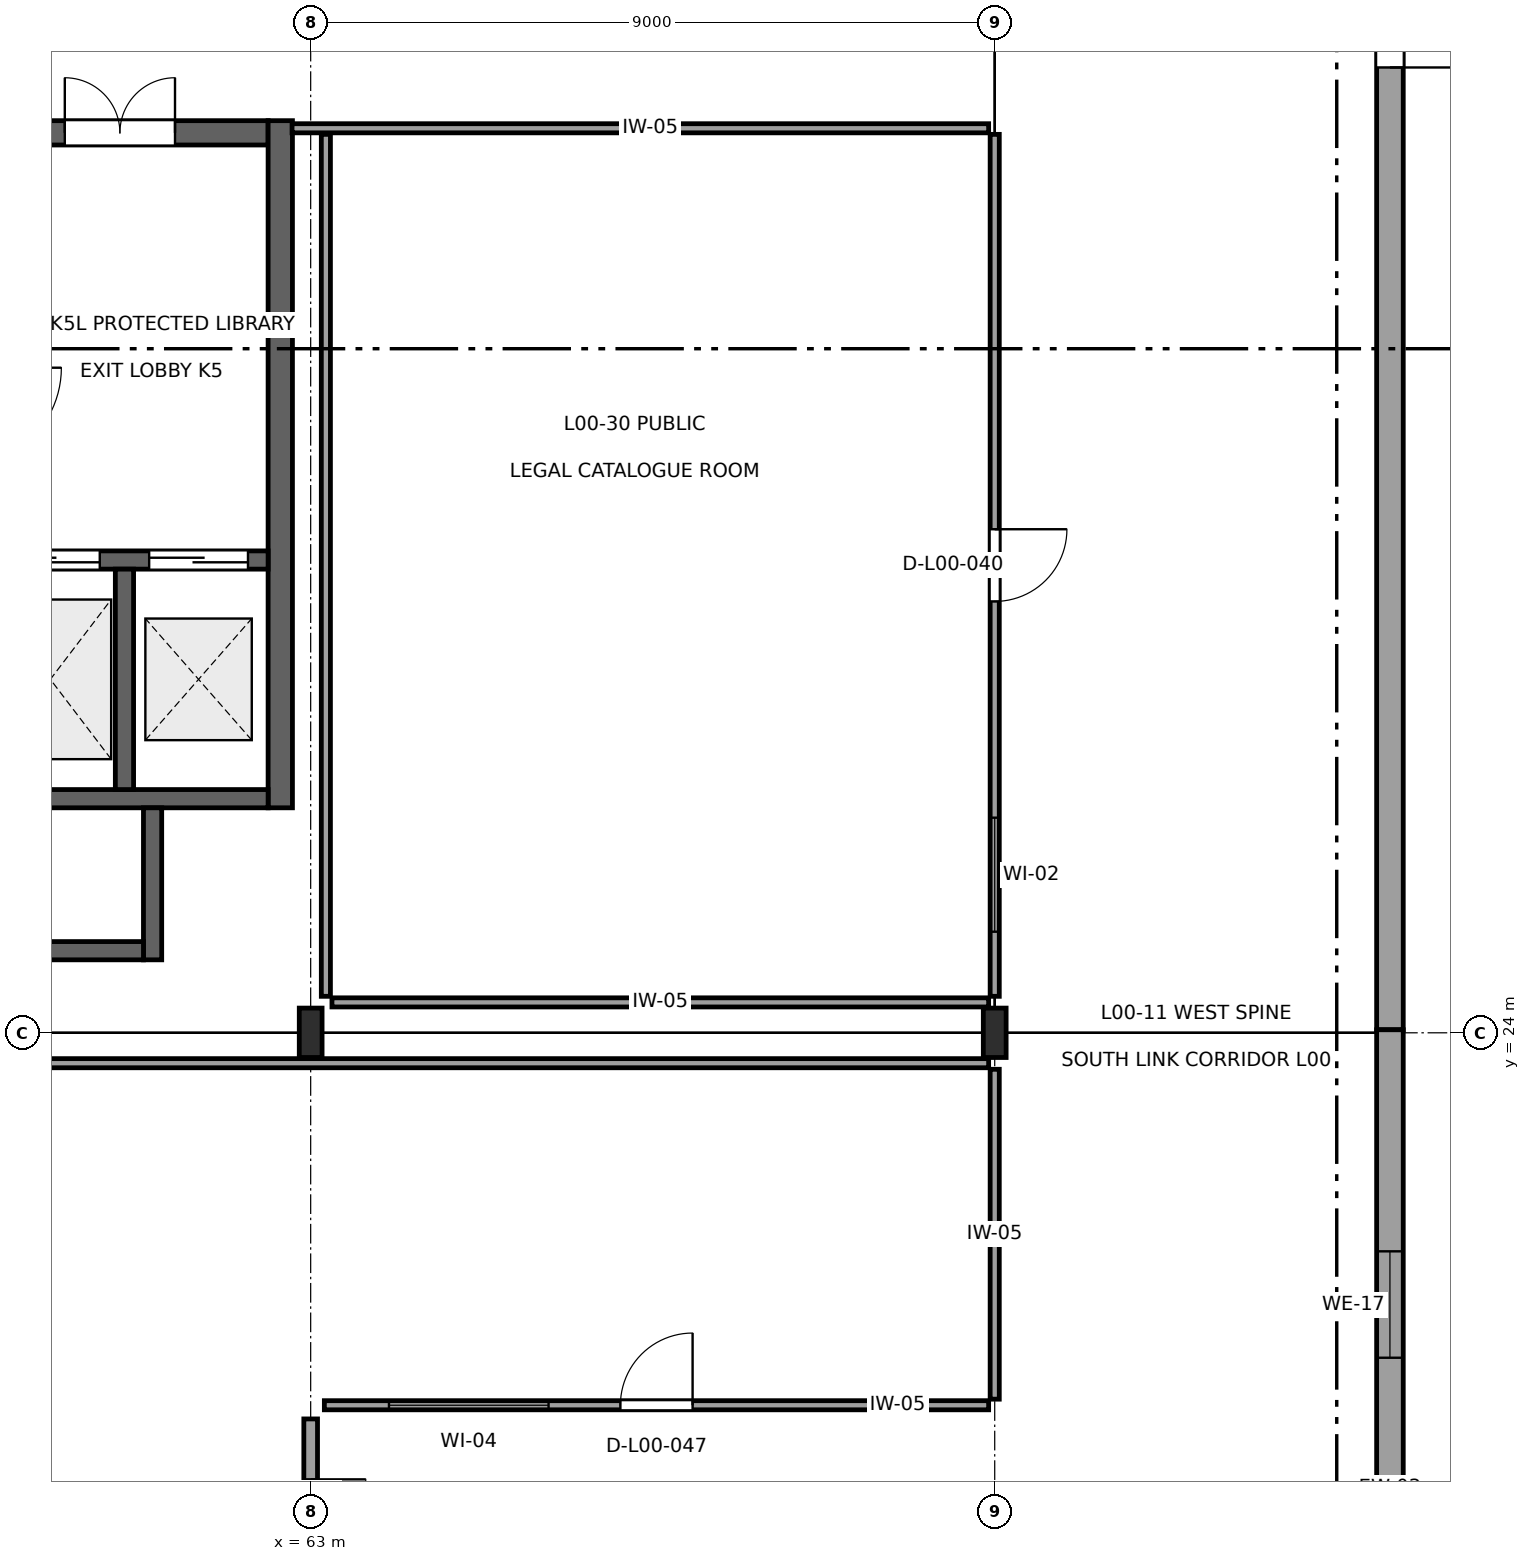
"""IFC4 building model, lengths in metres.
Left out: names, types, materials, properties, quantities, classifications, styles, units other than length and angle.
Written with IfcOpenShell. Run it as: python <this file> out.ifc"""

import sys

from ifc_helpers import new_model, si_unit, direction, frame, frame_2d, origin, origin_2d, place, context, subcontext, project, spatial, rectangle, i_section, extrude, element, fill, save


model = new_model("IFC4")
c1 = context("Model", 3, precision=1e-05, world=origin(), true_north=direction((0.0, 1.0)))
c2 = subcontext(c1, "Body", "Model", "MODEL_VIEW")
j1 = project(units=[si_unit("LENGTHUNIT", "METRE"), si_unit("PLANEANGLEUNIT", "RADIAN")], contexts=[c1])
p1 = place(None, origin())
s1 = spatial("IfcSite", under=j1, at=p1, CompositionType="ELEMENT")
p2 = place(p1, origin())
s2 = spatial("IfcBuilding", under=s1, at=p2, CompositionType="ELEMENT")
p3 = place(p2, origin())
s3 = spatial("IfcBuildingStorey", under=s2, at=p3, CompositionType="ELEMENT", Elevation=0.0)
for number, where, z_axis, x_axis in (
    (1, (63.0, 24.0, 0.0), (0.0, 0.0, 1.0), (1.0, 0.0, 0.0)),
    (2, (72.0, 24.0, 0.0), (0.0, 0.0, 1.0), (1.0, 0.0, 0.0)),
):
    element("IfcColumn", number, at=place(p3, frame(where, z_axis=z_axis, x_axis=x_axis)), inside=s3, PredefinedType="COLUMN", context=c2, shape_type="SweptSolid", body=[
        extrude(i_section(OverallWidth=0.3, OverallDepth=0.65, WebThickness=0.016, FlangeThickness=0.031, at=origin_2d()), origin(), (0.0, 0.0, 1.0), 5.4),
    ])
p4 = place(p3, frame((77.2, 24.04, 0.0), z_axis=(0.0, 0.0, 1.0), x_axis=(0.0, 1.0, 0.0)))
e3 = element("IfcWall", 3, at=p4, inside=s3, PredefinedType="SOLIDWALL", context=c2, shape_type="SweptSolid", body=[
    extrude(rectangle(XDim=17.97, YDim=0.35, at=frame_2d((8.985, 0.0))), origin(), (0.0, 0.0, 1.0), 5.08),
])
p5 = place(p4, frame((12.66, 0.0, 0.0)))
e4 = element("IfcOpeningElement", 4, at=p5, cuts=e3, PredefinedType="OPENING", context=c2, shape_type="SweptSolid", body=[
    extrude(rectangle(XDim=1.8, YDim=2.4, at=frame_2d((0.9, 1.2))), frame((0.0, 0.19, 0.0), z_axis=(0.0, -1.0, 0.0), x_axis=(1.0, 0.0, 0.0)), (0.0, 0.0, 1.0), 0.38),
])
p6 = place(p3, frame((77.2, 11.99, 0.0), z_axis=(0.0, 0.0, 1.0), x_axis=(0.0, 1.0, 0.0)))
e5 = element("IfcWall", 5, at=p6, inside=s3, PredefinedType="SOLIDWALL", context=c2, shape_type="SweptSolid", body=[
    extrude(rectangle(XDim=12.05, YDim=0.35, at=frame_2d((6.025, 0.0))), origin(), (0.0, 0.0, 1.0), 5.08),
])
p7 = place(p6, frame((2.07, 0.0, 0.85)))
e6 = element("IfcOpeningElement", 6, at=p7, cuts=e5, PredefinedType="OPENING", context=c2, shape_type="SweptSolid", body=[
    extrude(rectangle(XDim=1.4, YDim=1.4, at=frame_2d((0.7, 0.7))), frame((0.0, 0.19, 0.0), z_axis=(0.0, -1.0, 0.0), x_axis=(1.0, 0.0, 0.0)), (0.0, 0.0, 1.0), 0.38),
])
p8 = place(p6, frame((7.735, 0.0, 0.85)))
e7 = element("IfcOpeningElement", 7, at=p8, cuts=e5, PredefinedType="OPENING", context=c2, shape_type="SweptSolid", body=[
    extrude(rectangle(XDim=1.4, YDim=1.4, at=frame_2d((0.7, 0.7))), frame((0.0, 0.19, 0.0), z_axis=(0.0, -1.0, 0.0), x_axis=(1.0, 0.0, 0.0)), (0.0, 0.0, 1.0), 0.38),
])
p9 = place(p3, frame((58.54, 35.84, 0.0), z_axis=(0.0, 0.0, 1.0), x_axis=(1.0, 0.0, 0.0)))
e8 = element("IfcWall", 8, at=p9, inside=s3, PredefinedType="SHEAR", context=c2, shape_type="SweptSolid", body=[
    extrude(rectangle(XDim=3.9, YDim=0.32, at=frame_2d((1.95, 0.0))), origin(), (0.0, 0.0, 1.0), 5.06),
])
p10 = place(p9, frame((1.225, 0.0, 0.0)))
e9 = element("IfcOpeningElement", 9, at=p10, cuts=e8, PredefinedType="OPENING", context=c2, shape_type="SweptSolid", body=[
    extrude(rectangle(XDim=1.45, YDim=2.2, at=frame_2d((0.725, 1.1))), frame((0.0, 0.175, 0.0), z_axis=(0.0, -1.0, 0.0), x_axis=(1.0, 0.0, 0.0)), (0.0, 0.0, 1.0), 0.35),
])
p11 = place(p3, frame((62.6, 26.96, 0.0), z_axis=(0.0, 0.0, 1.0), x_axis=(0.0, 1.0, 0.0)))
e10 = element("IfcWall", 10, at=p11, inside=s3, PredefinedType="SHEAR", context=c2, shape_type="SweptSolid", body=[
    extrude(rectangle(XDim=9.04, YDim=0.32, at=frame_2d((4.52, 0.0))), origin(), (0.0, 0.0, 1.0), 5.06),
])
p12 = place(p3, frame((58.54, 30.22, 0.0), z_axis=(0.0, 0.0, 1.0), x_axis=(1.0, 0.0, 0.0)))
e11 = element("IfcWall", 11, at=p12, inside=s3, PredefinedType="SHEAR", context=c2, shape_type="SweptSolid", body=[
    extrude(rectangle(XDim=3.9, YDim=0.24, at=frame_2d((1.95, 0.0))), origin(), (0.0, 0.0, 1.0), 5.21),
])
p13 = place(p12, frame((0.385, 0.0, 0.0)))
e12 = element("IfcOpeningElement", 12, at=p13, cuts=e11, PredefinedType="OPENING", context=c2, shape_type="SweptSolid", body=[
    extrude(rectangle(XDim=1.3, YDim=2.2, at=frame_2d((0.65, 1.1))), frame((0.0, 0.135, 0.0), z_axis=(0.0, -1.0, 0.0), x_axis=(1.0, 0.0, 0.0)), (0.0, 0.0, 1.0), 0.27),
])
p14 = place(p12, frame((2.335, 0.0, 0.0)))
e13 = element("IfcOpeningElement", 13, at=p14, cuts=e11, PredefinedType="OPENING", context=c2, shape_type="SweptSolid", body=[
    extrude(rectangle(XDim=1.3, YDim=2.2, at=frame_2d((0.65, 1.1))), frame((0.0, 0.135, 0.0), z_axis=(0.0, -1.0, 0.0), x_axis=(1.0, 0.0, 0.0)), (0.0, 0.0, 1.0), 0.27),
])
p15 = place(p3, frame((58.54, 27.08, 0.0), z_axis=(0.0, 0.0, 1.0), x_axis=(1.0, 0.0, 0.0)))
e14 = element("IfcWall", 14, at=p15, inside=s3, PredefinedType="SHEAR", context=c2, shape_type="SweptSolid", body=[
    extrude(rectangle(XDim=3.9, YDim=0.24, at=frame_2d((1.95, 0.0))), origin(), (0.0, 0.0, 1.0), 5.21),
])
p16 = place(p3, frame((60.55, 27.2, 0.0), z_axis=(0.0, 0.0, 1.0), x_axis=(0.0, 1.0, 0.0)))
e15 = element("IfcWall", 15, at=p16, inside=s3, PredefinedType="SHEAR", context=c2, shape_type="SweptSolid", body=[
    extrude(rectangle(XDim=2.9, YDim=0.24, at=frame_2d((1.45, 0.0))), origin(), (0.0, 0.0, 1.0), 5.21),
])
p17 = place(p3, frame((60.92, 24.96, 0.0), z_axis=(0.0, 0.0, 1.0), x_axis=(0.0, 1.0, 0.0)))
e16 = element("IfcWall", 16, at=p17, inside=s3, PredefinedType="SHEAR", context=c2, shape_type="SweptSolid", body=[
    extrude(rectangle(XDim=2.0, YDim=0.24, at=frame_2d((1.0, 0.0))), origin(), (0.0, 0.0, 1.0), 5.21),
])
p18 = place(p3, frame((58.54, 25.08, 0.0), z_axis=(0.0, 0.0, 1.0), x_axis=(1.0, 0.0, 0.0)))
e17 = element("IfcWall", 17, at=p18, inside=s3, PredefinedType="SHEAR", context=c2, shape_type="SweptSolid", body=[
    extrude(rectangle(XDim=2.26, YDim=0.24, at=frame_2d((1.13, 0.0))), origin(), (0.0, 0.0, 1.0), 5.21),
])
p19 = place(p3, frame((63.0, 18.92, 0.0), z_axis=(0.0, 0.0, 1.0), x_axis=(0.0, -1.0, 0.0)))
e18 = element("IfcWall", 18, at=p19, inside=s3, PredefinedType="PARTITIONING", context=c2, shape_type="SweptSolid", body=[
    extrude(rectangle(XDim=3.04, YDim=0.18, at=frame_2d((1.52, 0.0))), origin(), (0.0, 0.0, 1.0), 4.635),
])
p20 = place(p19, frame((0.795, 0.0, 0.0)))
e19 = element("IfcOpeningElement", 19, at=p20, cuts=e18, PredefinedType="OPENING", context=c2, shape_type="SweptSolid", body=[
    extrude(rectangle(XDim=1.45, YDim=2.2, at=frame_2d((0.725, 1.1))), frame((0.0, 0.105, 0.0), z_axis=(0.0, -1.0, 0.0), x_axis=(1.0, 0.0, 0.0)), (0.0, 0.0, 1.0), 0.21),
])
p21 = place(p3, frame((72.0, 35.82, 0.0), z_axis=(0.0, 0.0, 1.0), x_axis=(0.0, -1.0, 0.0)))
e20 = element("IfcWall", 20, at=p21, inside=s3, PredefinedType="PARTITIONING", context=c2, shape_type="SweptSolid", body=[
    extrude(rectangle(XDim=11.34, YDim=0.12, at=frame_2d((5.67, 0.0))), origin(), (0.0, 0.0, 1.0), 4.255),
])
p22 = place(p21, frame((5.195, 0.0, 0.0)))
e21 = element("IfcOpeningElement", 21, at=p22, cuts=e20, PredefinedType="OPENING", context=c2, shape_type="SweptSolid", body=[
    extrude(rectangle(XDim=0.95, YDim=2.15, at=frame_2d((0.475, 1.075))), frame((0.0, 0.075, 0.0), z_axis=(0.0, -1.0, 0.0), x_axis=(1.0, 0.0, 0.0)), (0.0, 0.0, 1.0), 0.15),
])
p23 = place(p21, frame((8.99, 0.0, 1.05)))
e22 = element("IfcOpeningElement", 22, at=p23, cuts=e20, PredefinedType="OPENING", context=c2, shape_type="SweptSolid", body=[
    extrude(rectangle(XDim=1.5, YDim=1.1, at=frame_2d((0.75, 0.55))), frame((0.0, 0.075, 0.0), z_axis=(0.0, -1.0, 0.0), x_axis=(1.0, 0.0, 0.0)), (0.0, 0.0, 1.0), 0.15),
])
p24 = place(p3, frame((71.92, 24.4, 0.0), z_axis=(0.0, 0.0, 1.0), x_axis=(-1.0, 0.0, 0.0)))
e23 = element("IfcWall", 23, at=p24, inside=s3, PredefinedType="PARTITIONING", context=c2, shape_type="SweptSolid", body=[
    extrude(rectangle(XDim=8.64, YDim=0.12, at=frame_2d((4.32, 0.0))), origin(), (0.0, 0.0, 1.0), 5.04),
])
p25 = place(p3, frame((63.2, 24.48, 0.0), z_axis=(0.0, 0.0, 1.0), x_axis=(0.0, 1.0, 0.0)))
e24 = element("IfcWall", 24, at=p25, inside=s3, PredefinedType="PARTITIONING", context=c2, shape_type="SweptSolid", body=[
    extrude(rectangle(XDim=11.34, YDim=0.12, at=frame_2d((5.67, 0.0))), origin(), (0.0, 0.0, 1.0), 4.265),
])
p26 = place(p3, frame((62.755, 35.9, 0.0), z_axis=(0.0, 0.0, 1.0), x_axis=(1.0, 0.0, 0.0)))
e25 = element("IfcWall", 25, at=p26, inside=s3, PredefinedType="PARTITIONING", context=c2, shape_type="SweptSolid", body=[
    extrude(rectangle(XDim=9.165, YDim=0.12, at=frame_2d((4.583, 0.0))), origin(), (0.0, 0.0, 1.0), 5.04),
])
p27 = place(p3, frame((45.48, 23.6, 0.0), z_axis=(0.0, 0.0, 1.0), x_axis=(1.0, 0.0, 0.0)))
e26 = element("IfcWall", 26, at=p27, inside=s3, PredefinedType="PARTITIONING", context=c2, shape_type="SweptSolid", body=[
    extrude(rectangle(XDim=26.44, YDim=0.12, at=frame_2d((13.22, 0.0))), origin(), (0.0, 0.0, 1.0), 5.04),
])
p28 = place(p3, frame((72.0, 23.52, 0.0), z_axis=(0.0, 0.0, 1.0), x_axis=(0.0, -1.0, 0.0)))
e27 = element("IfcWall", 27, at=p28, inside=s3, PredefinedType="PARTITIONING", context=c2, shape_type="SweptSolid", body=[
    extrude(rectangle(XDim=4.34, YDim=0.12, at=frame_2d((2.17, 0.0))), origin(), (0.0, 0.0, 1.0), 4.585),
])
p29 = place(p3, frame((71.92, 19.1, 0.0), z_axis=(0.0, 0.0, 1.0), x_axis=(-1.0, 0.0, 0.0)))
e28 = element("IfcWall", 28, at=p29, inside=s3, PredefinedType="PARTITIONING", context=c2, shape_type="SweptSolid", body=[
    extrude(rectangle(XDim=8.74, YDim=0.12, at=frame_2d((4.37, 0.0))), origin(), (0.0, 0.0, 1.0), 5.04),
])
p30 = place(p29, frame((3.895, 0.0, 0.0)))
e29 = element("IfcOpeningElement", 29, at=p30, cuts=e28, PredefinedType="OPENING", context=c2, shape_type="SweptSolid", body=[
    extrude(rectangle(XDim=0.95, YDim=2.15, at=frame_2d((0.475, 1.075))), frame((0.0, 0.075, 0.0), z_axis=(0.0, -1.0, 0.0), x_axis=(1.0, 0.0, 0.0)), (0.0, 0.0, 1.0), 0.15),
])
p31 = place(p29, frame((5.79, 0.0, 1.05)))
e30 = element("IfcOpeningElement", 30, at=p31, cuts=e28, PredefinedType="OPENING", context=c2, shape_type="SweptSolid", body=[
    extrude(rectangle(XDim=2.1, YDim=1.2, at=frame_2d((1.05, 0.6))), frame((0.0, 0.075, 0.0), z_axis=(0.0, -1.0, 0.0), x_axis=(1.0, 0.0, 0.0)), (0.0, 0.0, 1.0), 0.15),
])
p32 = place(p5, frame((1.8, 0.0, 0.0), z_axis=(0.0, 0.0, 1.0), x_axis=(-1.0, 0.0, 0.0)))
e31 = element("IfcDoor", 31, at=p32, inside=s3, OperationType="DOUBLE_DOOR_SINGLE_SWING", PredefinedType="DOOR", context=c2, shape_type="SweptSolid", body=[
    extrude(rectangle(XDim=1.8, YDim=2.4, at=frame_2d((0.9, 1.2))), frame((0.0, 0.025, 0.0), z_axis=(0.0, -1.0, 0.0), x_axis=(1.0, 0.0, 0.0)), (0.0, 0.0, 1.0), 0.05),
])
fill(e4, e31)
p33 = place(p8, origin())
e32 = element("IfcWindow", 32, at=p33, inside=s3, PartitioningType="SINGLE_PANEL", PredefinedType="WINDOW", context=c2, shape_type="SweptSolid", body=[
    extrude(rectangle(XDim=1.4, YDim=1.4, at=frame_2d((0.7, 0.7))), frame((0.0, 0.03, 0.0), z_axis=(0.0, -1.0, 0.0), x_axis=(1.0, 0.0, 0.0)), (0.0, 0.0, 1.0), 0.06),
])
fill(e7, e32)
p34 = place(p10, origin())
e33 = element("IfcDoor", 33, at=p34, inside=s3, OperationType="DOUBLE_DOOR_SINGLE_SWING", PredefinedType="DOOR", context=c2, shape_type="SweptSolid", body=[
    extrude(rectangle(XDim=1.45, YDim=2.2, at=frame_2d((0.725, 1.1))), frame((0.0, 0.025, 0.0), z_axis=(0.0, -1.0, 0.0), x_axis=(1.0, 0.0, 0.0)), (0.0, 0.0, 1.0), 0.05),
])
fill(e9, e33)
p35 = place(p13, origin())
e34 = element("IfcDoor", 34, at=p35, inside=s3, OperationType="DOUBLE_DOOR_SLIDING", PredefinedType="DOOR", context=c2, shape_type="SweptSolid", body=[
    extrude(rectangle(XDim=1.3, YDim=2.2, at=frame_2d((0.65, 1.1))), frame((0.0, 0.025, 0.0), z_axis=(0.0, -1.0, 0.0), x_axis=(1.0, 0.0, 0.0)), (0.0, 0.0, 1.0), 0.05),
])
fill(e12, e34)
p36 = place(p14, origin())
e35 = element("IfcDoor", 35, at=p36, inside=s3, OperationType="DOUBLE_DOOR_SLIDING", PredefinedType="DOOR", context=c2, shape_type="SweptSolid", body=[
    extrude(rectangle(XDim=1.3, YDim=2.2, at=frame_2d((0.65, 1.1))), frame((0.0, 0.025, 0.0), z_axis=(0.0, -1.0, 0.0), x_axis=(1.0, 0.0, 0.0)), (0.0, 0.0, 1.0), 0.05),
])
fill(e13, e35)
p37 = place(p20, origin())
e36 = element("IfcDoor", 36, at=p37, inside=s3, OperationType="DOUBLE_DOOR_SINGLE_SWING", PredefinedType="DOOR", context=c2, shape_type="SweptSolid", body=[
    extrude(rectangle(XDim=1.45, YDim=2.2, at=frame_2d((0.725, 1.1))), frame((0.0, 0.025, 0.0), z_axis=(0.0, -1.0, 0.0), x_axis=(1.0, 0.0, 0.0)), (0.0, 0.0, 1.0), 0.05),
])
fill(e19, e36)
p38 = place(p22, origin())
e37 = element("IfcDoor", 37, at=p38, inside=s3, OperationType="SINGLE_SWING_LEFT", PredefinedType="DOOR", context=c2, shape_type="SweptSolid", body=[
    extrude(rectangle(XDim=0.95, YDim=2.15, at=frame_2d((0.475, 1.075))), frame((0.0, 0.025, 0.0), z_axis=(0.0, -1.0, 0.0), x_axis=(1.0, 0.0, 0.0)), (0.0, 0.0, 1.0), 0.05),
])
fill(e21, e37)
p39 = place(p23, origin())
e38 = element("IfcWindow", 38, at=p39, inside=s3, PartitioningType="SINGLE_PANEL", PredefinedType="WINDOW", context=c2, shape_type="SweptSolid", body=[
    extrude(rectangle(XDim=1.5, YDim=1.1, at=frame_2d((0.75, 0.55))), frame((0.0, 0.03, 0.0), z_axis=(0.0, -1.0, 0.0), x_axis=(1.0, 0.0, 0.0)), (0.0, 0.0, 1.0), 0.06),
])
fill(e22, e38)
p40 = place(p30, frame((0.95, 0.0, 0.0), z_axis=(0.0, 0.0, 1.0), x_axis=(-1.0, 0.0, 0.0)))
e39 = element("IfcDoor", 39, at=p40, inside=s3, OperationType="SINGLE_SWING_LEFT", PredefinedType="DOOR", context=c2, shape_type="SweptSolid", body=[
    extrude(rectangle(XDim=0.95, YDim=2.15, at=frame_2d((0.475, 1.075))), frame((0.0, 0.025, 0.0), z_axis=(0.0, -1.0, 0.0), x_axis=(1.0, 0.0, 0.0)), (0.0, 0.0, 1.0), 0.05),
])
fill(e29, e39)
p41 = place(p31, origin())
e40 = element("IfcWindow", 40, at=p41, inside=s3, PartitioningType="SINGLE_PANEL", PredefinedType="WINDOW", context=c2, shape_type="SweptSolid", body=[
    extrude(rectangle(XDim=2.1, YDim=1.2, at=frame_2d((1.05, 0.6))), frame((0.0, 0.03, 0.0), z_axis=(0.0, -1.0, 0.0), x_axis=(1.0, 0.0, 0.0)), (0.0, 0.0, 1.0), 0.06),
])
fill(e30, e40)
save(model, sys.argv[1])
